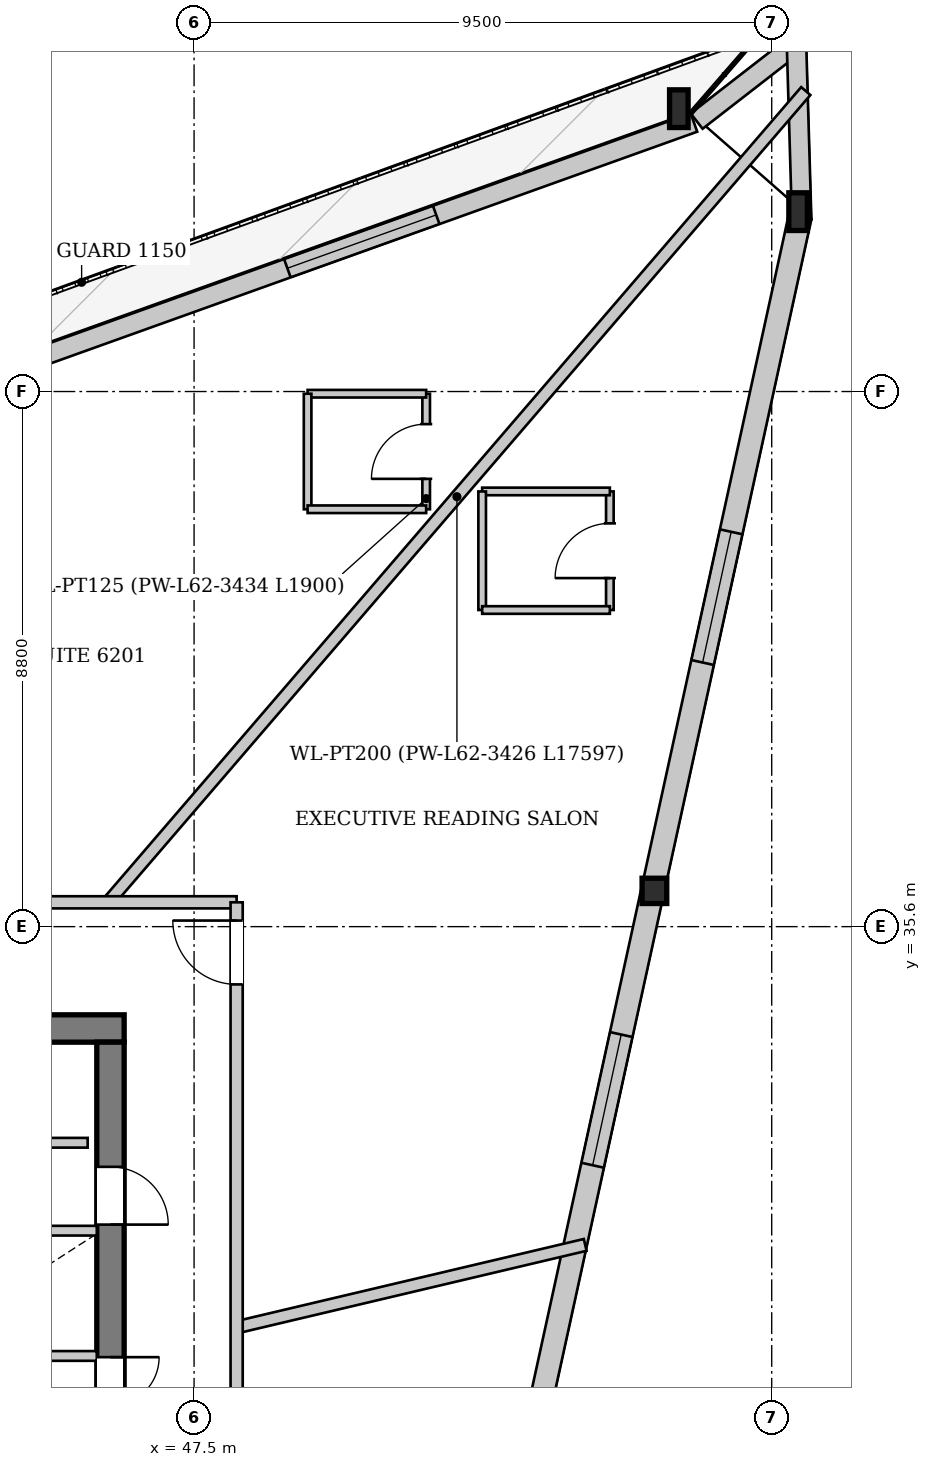
"""IFC4 building model, lengths in metres.
Left out: names, types, materials, properties, quantities, classifications, styles, units other than length and angle.
Written with IfcOpenShell. Run it as: python <this file> out.ifc"""

import sys

from ifc_helpers import new_model, si_unit, direction, frame, frame_2d, origin, origin_2d, place, context, subcontext, project, spatial, rectangle, i_section, extrude, source, transform, mapped, element, fill, save


model = new_model("IFC4")
c1 = context("Model", 3, precision=1e-05, world=origin(), true_north=direction((0.0, 1.0)))
c2 = subcontext(c1, "Body", "Model", "MODEL_VIEW")
j1 = project(units=[si_unit("LENGTHUNIT", "METRE"), si_unit("PLANEANGLEUNIT", "RADIAN")], contexts=[c1])
p1 = place(None, origin())
s1 = spatial("IfcSite", under=j1, at=p1, CompositionType="ELEMENT")
p2 = place(p1, origin())
s2 = spatial("IfcBuilding", under=s1, at=p2, CompositionType="ELEMENT")
p3 = place(p2, frame((0.0, 0.0, 234.5)))
s3 = spatial("IfcBuildingStorey", under=s2, at=p3, CompositionType="ELEMENT", Elevation=234.5)
m1 = source(origin(), c2, "Body", "SweptSolid", [
    extrude(i_section(OverallWidth=0.305, OverallDepth=0.62, WebThickness=0.021, FlangeThickness=0.04, at=origin_2d()), origin(), (0.0, 0.0, 1.0), 3.472),
])
p4 = place(p3, frame((57.653, 47.233, 0.0), z_axis=(-0.125805703613, 0.072150168757, 0.989427752838), x_axis=(-0.497496020718, -0.867466258347, 0.0)))
e1 = element("IfcColumn", 1, at=p4, inside=s3, PredefinedType="COLUMN", context=c2, shape_type="MappedRepresentation", body=[
    mapped(m1, transform((0.0, 0.0, 0.0), x_axis=(1.0, 0.0, 0.0), y_axis=(0.0, 1.0, 0.0), z_axis=(0.0, 0.0, 1.0), scale=1.0)),
])
m2 = source(origin(), c2, "Body", "SweptSolid", [
    extrude(i_section(OverallWidth=0.305, OverallDepth=0.62, WebThickness=0.021, FlangeThickness=0.04, at=origin_2d()), origin(), (0.0, 0.0, 1.0), 3.46),
])
p5 = place(p3, frame((55.667, 48.974, 0.0), z_axis=(-0.112317530713, 0.044941122528, 0.992655563527), x_axis=(-0.371491223958, -0.928436465528, 0.0)))
e2 = element("IfcColumn", 2, at=p5, inside=s3, PredefinedType="COLUMN", context=c2, shape_type="MappedRepresentation", body=[
    mapped(m2, transform((0.0, 0.0, 0.0), x_axis=(1.0, 0.0, 0.0), y_axis=(0.0, 1.0, 0.0), z_axis=(0.0, 0.0, 1.0), scale=1.0)),
])
m3 = source(origin(), c2, "Body", "SweptSolid", [
    extrude(i_section(OverallWidth=0.406, OverallDepth=0.416, WebThickness=0.027, FlangeThickness=0.042, at=origin_2d()), origin(), (0.0, 0.0, 1.0), 3.455),
])
p6 = place(p3, frame((55.209, 36.062, 0.0), z_axis=(-0.079842257415, 0.072847227783, 0.994142090113), x_axis=(-0.674005803271, -0.738726050141, 0.0)))
e3 = element("IfcColumn", 3, at=p6, inside=s3, PredefinedType="COLUMN", context=c2, shape_type="MappedRepresentation", body=[
    mapped(m3, transform((0.0, 0.0, 0.0), x_axis=(1.0, 0.0, 0.0), y_axis=(0.0, 1.0, 0.0), z_axis=(0.0, 0.0, 1.0), scale=1.0)),
])
p7 = place(p3, frame((34.711, 41.295, 0.0), z_axis=(0.0, 0.0, 1.0), x_axis=(0.941393680714, 0.337309854455, 0.0)))
e4 = element("IfcWall", 4, at=p7, inside=s3, PredefinedType="SOLIDWALL", context=c2, shape_type="SweptSolid", body=[
    extrude(rectangle(XDim=22.318, YDim=0.32, at=frame_2d((11.159, 0.0))), origin(), (0.0, 0.0, 1.0), 2.872),
])
p8 = place(p7, frame((6.392, 0.0, 0.0)))
e5 = element("IfcOpeningElement", 5, at=p8, cuts=e4, PredefinedType="OPENING", context=c2, shape_type="SweptSolid", body=[
    extrude(rectangle(XDim=1.5, YDim=2.3, at=frame_2d((0.75, 1.15))), frame((0.0, 0.17, 0.0), z_axis=(0.0, -1.0, 0.0), x_axis=(1.0, 0.0, 0.0)), (0.0, 0.0, 1.0), 0.34),
])
p9 = place(p7, frame((15.215, 0.0, 0.402)))
e6 = element("IfcOpeningElement", 6, at=p9, cuts=e4, PredefinedType="OPENING", context=c2, shape_type="SweptSolid", body=[
    extrude(rectangle(XDim=2.6, YDim=2.35, at=frame_2d((1.3, 1.175))), frame((0.0, 0.17, 0.0), z_axis=(0.0, -1.0, 0.0), x_axis=(1.0, 0.0, 0.0)), (0.0, 0.0, 1.0), 0.34),
])
p10 = place(p3, frame((55.765, 48.847, 0.0), z_axis=(0.0, 0.0, 1.0), x_axis=(0.790076637558, 0.613008080522, 0.0)))
e7 = element("IfcWall", 7, at=p10, inside=s3, PredefinedType="SOLIDWALL", context=c2, shape_type="SweptSolid", body=[
    extrude(rectangle(XDim=2.394, YDim=0.32, at=frame_2d((1.197, 0.0))), origin(), (0.0, 0.0, 1.0), 2.872),
])
p11 = place(p3, frame((57.398, 50.437, 0.0), z_axis=(0.0, 0.0, 1.0), x_axis=(0.029434813094, -0.999566702015, 0.0)))
e8 = element("IfcWall", 8, at=p11, inside=s3, PredefinedType="SOLIDWALL", context=c2, shape_type="SweptSolid", body=[
    extrude(rectangle(XDim=3.21, YDim=0.32, at=frame_2d((1.605, 0.0))), origin(), (0.0, 0.0, 1.0), 2.872),
])
p12 = place(p3, frame((57.467, 47.273, 0.0), z_axis=(0.0, 0.0, 1.0), x_axis=(-0.213695286904, -0.976900365623, 0.0)))
e9 = element("IfcWall", 9, at=p12, inside=s3, PredefinedType="SOLIDWALL", context=c2, shape_type="SweptSolid", body=[
    extrude(rectangle(XDim=22.869, YDim=0.38, at=frame_2d((11.435, 0.0))), origin(), (0.0, 0.0, 1.0), 2.872),
])
p13 = place(p12, frame((5.303, 0.0, 0.502)))
e10 = element("IfcOpeningElement", 10, at=p13, cuts=e9, PredefinedType="OPENING", context=c2, shape_type="SweptSolid", body=[
    extrude(rectangle(XDim=2.2, YDim=2.25, at=frame_2d((1.1, 1.125))), frame((0.0, 0.2, 0.0), z_axis=(0.0, -1.0, 0.0), x_axis=(1.0, 0.0, 0.0)), (0.0, 0.0, 1.0), 0.4),
])
p14 = place(p12, frame((13.766, 0.0, 0.502)))
e11 = element("IfcOpeningElement", 11, at=p14, cuts=e9, PredefinedType="OPENING", context=c2, shape_type="SweptSolid", body=[
    extrude(rectangle(XDim=2.2, YDim=2.25, at=frame_2d((1.1, 1.125))), frame((0.0, 0.2, 0.0), z_axis=(0.0, -1.0, 0.0), x_axis=(1.0, 0.0, 0.0)), (0.0, 0.0, 1.0), 0.4),
])
p15 = place(p3, frame((29.65, 33.925, 0.0), z_axis=(0.0, 0.0, 1.0), x_axis=(1.0, 0.0, 0.0)))
e12 = element("IfcWall", 12, at=p15, inside=s3, PredefinedType="SHEAR", context=c2, shape_type="SweptSolid", body=[
    extrude(rectangle(XDim=16.7, YDim=0.45, at=frame_2d((8.35, 0.0))), origin(), (0.0, 0.0, 1.0), 3.38),
])
p16 = place(p15, frame((1.45, 0.0, 0.0)))
e13 = element("IfcOpeningElement", 13, at=p16, cuts=e12, PredefinedType="OPENING", context=c2, shape_type="SweptSolid", body=[
    extrude(rectangle(XDim=0.95, YDim=2.1, at=frame_2d((0.475, 1.05))), frame((0.0, 0.235, 0.0), z_axis=(0.0, -1.0, 0.0), x_axis=(1.0, 0.0, 0.0)), (0.0, 0.0, 1.0), 0.47),
])
p17 = place(p15, frame((3.83, 0.0, 0.0)))
e14 = element("IfcOpeningElement", 14, at=p17, cuts=e12, PredefinedType="OPENING", context=c2, shape_type="SweptSolid", body=[
    extrude(rectangle(XDim=1.32, YDim=2.2, at=frame_2d((0.66, 1.1))), frame((0.0, 0.235, 0.0), z_axis=(0.0, -1.0, 0.0), x_axis=(1.0, 0.0, 0.0)), (0.0, 0.0, 1.0), 0.47),
])
p18 = place(p3, frame((46.125, 33.7, 0.0), z_axis=(0.0, 0.0, 1.0), x_axis=(0.0, -1.0, 0.0)))
e15 = element("IfcWall", 15, at=p18, inside=s3, PredefinedType="SHEAR", context=c2, shape_type="SweptSolid", body=[
    extrude(rectangle(XDim=14.2, YDim=0.45, at=frame_2d((7.1, 0.0))), origin(), (0.0, 0.0, 1.0), 3.38),
])
p19 = place(p18, frame((5.18, 0.0, 0.0)))
e16 = element("IfcOpeningElement", 16, at=p19, cuts=e15, PredefinedType="OPENING", context=c2, shape_type="SweptSolid", body=[
    extrude(rectangle(XDim=1.6, YDim=2.2, at=frame_2d((0.8, 1.1))), frame((0.0, 0.235, 0.0), z_axis=(0.0, -1.0, 0.0), x_axis=(1.0, 0.0, 0.0)), (0.0, 0.0, 1.0), 0.47),
])
p20 = place(p18, frame((2.05, 0.0, 0.0)))
e17 = element("IfcOpeningElement", 17, at=p20, cuts=e15, PredefinedType="OPENING", context=c2, shape_type="SweptSolid", body=[
    extrude(rectangle(XDim=0.95, YDim=2.1, at=frame_2d((0.475, 1.05))), frame((0.0, 0.235, 0.0), z_axis=(0.0, -1.0, 0.0), x_axis=(1.0, 0.0, 0.0)), (0.0, 0.0, 1.0), 0.47),
])
p21 = place(p3, frame((33.28, 28.54, 0.0), z_axis=(0.0, 0.0, 1.0), x_axis=(1.0, 0.0, 0.0)))
e18 = element("IfcWall", 18, at=p21, inside=s3, PredefinedType="PARTITIONING", context=c2, shape_type="SweptSolid", body=[
    extrude(rectangle(XDim=12.62, YDim=0.16, at=frame_2d((6.31, 0.0))), origin(), (0.0, 0.0, 1.0), 3.38),
])
p22 = place(p21, frame((0.26, 0.0, 0.0)))
e19 = element("IfcOpeningElement", 19, at=p22, cuts=e18, PredefinedType="OPENING", context=c2, shape_type="SweptSolid", body=[
    extrude(rectangle(XDim=1.1, YDim=2.2, at=frame_2d((0.55, 1.1))), frame((0.0, 0.09, 0.0), z_axis=(0.0, -1.0, 0.0), x_axis=(1.0, 0.0, 0.0)), (0.0, 0.0, 1.0), 0.18),
])
p23 = place(p21, frame((2.01, 0.0, 0.0)))
e20 = element("IfcOpeningElement", 20, at=p23, cuts=e18, PredefinedType="OPENING", context=c2, shape_type="SweptSolid", body=[
    extrude(rectangle(XDim=1.1, YDim=2.2, at=frame_2d((0.55, 1.1))), frame((0.0, 0.09, 0.0), z_axis=(0.0, -1.0, 0.0), x_axis=(1.0, 0.0, 0.0)), (0.0, 0.0, 1.0), 0.18),
])
p24 = place(p21, frame((3.76, 0.0, 0.0)))
e21 = element("IfcOpeningElement", 21, at=p24, cuts=e18, PredefinedType="OPENING", context=c2, shape_type="SweptSolid", body=[
    extrude(rectangle(XDim=1.1, YDim=2.2, at=frame_2d((0.55, 1.1))), frame((0.0, 0.09, 0.0), z_axis=(0.0, -1.0, 0.0), x_axis=(1.0, 0.0, 0.0)), (0.0, 0.0, 1.0), 0.18),
])
p25 = place(p3, frame((40.72, 30.6, 0.0), z_axis=(0.0, 0.0, 1.0), x_axis=(1.0, 0.0, 0.0)))
e22 = element("IfcWall", 22, at=p25, inside=s3, PredefinedType="PARTITIONING", context=c2, shape_type="SweptSolid", body=[
    extrude(rectangle(XDim=5.18, YDim=0.16, at=frame_2d((2.59, 0.0))), origin(), (0.0, 0.0, 1.0), 3.38),
])
p26 = place(p3, frame((40.72, 32.046, 0.0), z_axis=(0.0, 0.0, 1.0), x_axis=(1.0, 0.0, 0.0)))
e23 = element("IfcWall", 23, at=p26, inside=s3, PredefinedType="PARTITIONING", context=c2, shape_type="SweptSolid", body=[
    extrude(rectangle(XDim=5.03, YDim=0.16, at=frame_2d((2.515, 0.0))), origin(), (0.0, 0.0, 1.0), 3.38),
])
p27 = place(p26, frame((2.1, 0.0, 0.0)))
e24 = element("IfcOpeningElement", 24, at=p27, cuts=e23, PredefinedType="OPENING", context=c2, shape_type="SweptSolid", body=[
    extrude(rectangle(XDim=0.95, YDim=2.1, at=frame_2d((0.475, 1.05))), frame((0.0, 0.09, 0.0), z_axis=(0.0, -1.0, 0.0), x_axis=(1.0, 0.0, 0.0)), (0.0, 0.0, 1.0), 0.18),
])
p28 = place(p3, frame((46.085, 36.0, 0.0), z_axis=(0.0, 0.0, 1.0), x_axis=(0.652105460698, 0.758128266277, 0.0)))
e25 = element("IfcWall", 25, at=p28, inside=s3, PredefinedType="PARTITIONING", context=c2, shape_type="SweptSolid", body=[
    extrude(rectangle(XDim=17.597, YDim=0.2, at=frame_2d((8.799, 0.0))), origin(), (0.0, 0.0, 1.0), 2.975),
])
p29 = place(p3, frame((48.2, 29.011, 0.0), z_axis=(0.0, 0.0, 1.0), x_axis=(0.973180732473, 0.230041869979, 0.0)))
e26 = element("IfcWall", 26, at=p29, inside=s3, PredefinedType="PARTITIONING", context=c2, shape_type="SweptSolid", body=[
    extrude(rectangle(XDim=5.89, YDim=0.2, at=frame_2d((2.945, 0.0))), origin(), (0.0, 0.0, 1.0), 3.38),
])
p30 = place(p3, frame((51.317, 42.464, 0.0), z_axis=(0.0, 0.0, 1.0), x_axis=(0.0, 1.0, 0.0)))
e27 = element("IfcWall", 27, at=p30, inside=s3, PredefinedType="PARTITIONING", context=c2, shape_type="SweptSolid", body=[
    extrude(rectangle(XDim=1.9, YDim=0.125, at=frame_2d((0.95, 0.0))), origin(), (0.0, 0.0, 1.0), 3.38),
])
p31 = place(p30, frame((0.5, 0.0, 0.0)))
e28 = element("IfcOpeningElement", 28, at=p31, cuts=e27, PredefinedType="OPENING", context=c2, shape_type="SweptSolid", body=[
    extrude(rectangle(XDim=0.9, YDim=2.1, at=frame_2d((0.45, 1.05))), frame((0.0, 0.073, 0.0), z_axis=(0.0, -1.0, 0.0), x_axis=(1.0, 0.0, 0.0)), (0.0, 0.0, 1.0), 0.145),
])
p32 = place(p3, frame((51.317, 44.364, 0.0), z_axis=(0.0, 0.0, 1.0), x_axis=(-1.0, 0.0, 0.0)))
e29 = element("IfcWall", 29, at=p32, inside=s3, PredefinedType="PARTITIONING", context=c2, shape_type="SweptSolid", body=[
    extrude(rectangle(XDim=1.95, YDim=0.125, at=frame_2d((0.975, 0.0))), origin(), (0.0, 0.0, 1.0), 3.38),
])
p33 = place(p3, frame((49.367, 44.364, 0.0), z_axis=(0.0, 0.0, 1.0), x_axis=(0.0, -1.0, 0.0)))
e30 = element("IfcWall", 30, at=p33, inside=s3, PredefinedType="PARTITIONING", context=c2, shape_type="SweptSolid", body=[
    extrude(rectangle(XDim=1.9, YDim=0.125, at=frame_2d((0.95, 0.0))), origin(), (0.0, 0.0, 1.0), 3.38),
])
p34 = place(p3, frame((49.367, 42.464, 0.0), z_axis=(0.0, 0.0, 1.0), x_axis=(1.0, 0.0, 0.0)))
e31 = element("IfcWall", 31, at=p34, inside=s3, PredefinedType="PARTITIONING", context=c2, shape_type="SweptSolid", body=[
    extrude(rectangle(XDim=1.95, YDim=0.125, at=frame_2d((0.975, 0.0))), origin(), (0.0, 0.0, 1.0), 3.125),
])
p35 = place(p3, frame((54.338, 40.807, 0.0), z_axis=(0.0, 0.0, 1.0), x_axis=(0.0, 1.0, 0.0)))
e32 = element("IfcWall", 32, at=p35, inside=s3, PredefinedType="PARTITIONING", context=c2, shape_type="SweptSolid", body=[
    extrude(rectangle(XDim=1.95, YDim=0.125, at=frame_2d((0.975, 0.0))), origin(), (0.0, 0.0, 1.0), 3.38),
])
p36 = place(p35, frame((0.525, 0.0, 0.0)))
e33 = element("IfcOpeningElement", 33, at=p36, cuts=e32, PredefinedType="OPENING", context=c2, shape_type="SweptSolid", body=[
    extrude(rectangle(XDim=0.9, YDim=2.1, at=frame_2d((0.45, 1.05))), frame((0.0, 0.073, 0.0), z_axis=(0.0, -1.0, 0.0), x_axis=(1.0, 0.0, 0.0)), (0.0, 0.0, 1.0), 0.145),
])
p37 = place(p3, frame((54.338, 42.757, 0.0), z_axis=(0.0, 0.0, 1.0), x_axis=(-1.0, 0.0, 0.0)))
e34 = element("IfcWall", 34, at=p37, inside=s3, PredefinedType="PARTITIONING", context=c2, shape_type="SweptSolid", body=[
    extrude(rectangle(XDim=2.1, YDim=0.125, at=frame_2d((1.05, 0.0))), origin(), (0.0, 0.0, 1.0), 3.38),
])
p38 = place(p3, frame((52.238, 42.757, 0.0), z_axis=(0.0, 0.0, 1.0), x_axis=(0.0, -1.0, 0.0)))
e35 = element("IfcWall", 35, at=p38, inside=s3, PredefinedType="PARTITIONING", context=c2, shape_type="SweptSolid", body=[
    extrude(rectangle(XDim=1.95, YDim=0.125, at=frame_2d((0.975, 0.0))), origin(), (0.0, 0.0, 1.0), 3.38),
])
p39 = place(p3, frame((52.238, 40.807, 0.0), z_axis=(0.0, 0.0, 1.0), x_axis=(1.0, 0.0, 0.0)))
e36 = element("IfcWall", 36, at=p39, inside=s3, PredefinedType="PARTITIONING", context=c2, shape_type="SweptSolid", body=[
    extrude(rectangle(XDim=2.1, YDim=0.125, at=frame_2d((1.05, 0.0))), origin(), (0.0, 0.0, 1.0), 3.38),
])
p40 = place(p3, frame((43.4, 36.0, 0.0), z_axis=(0.0, 0.0, 1.0), x_axis=(1.0, 0.0, 0.0)))
e37 = element("IfcWall", 37, at=p40, inside=s3, PredefinedType="PARTITIONING", context=c2, shape_type="SweptSolid", body=[
    extrude(rectangle(XDim=4.8, YDim=0.2, at=frame_2d((2.4, 0.0))), origin(), (0.0, 0.0, 1.0), 3.38),
])
p41 = place(p3, frame((48.2, 17.2, 0.0), z_axis=(0.0, 0.0, 1.0), x_axis=(0.0, 1.0, 0.0)))
e38 = element("IfcWall", 38, at=p41, inside=s3, PredefinedType="PARTITIONING", context=c2, shape_type="SweptSolid", body=[
    extrude(rectangle(XDim=18.8, YDim=0.2, at=frame_2d((9.4, 0.0))), origin(), (0.0, 0.0, 1.0), 3.065),
])
p42 = place(p41, frame((4.507, 0.0, 0.0)))
e39 = element("IfcOpeningElement", 39, at=p42, cuts=e38, PredefinedType="OPENING", context=c2, shape_type="SweptSolid", body=[
    extrude(rectangle(XDim=1.05, YDim=2.2, at=frame_2d((0.525, 1.1))), frame((0.0, 0.11, 0.0), z_axis=(0.0, -1.0, 0.0), x_axis=(1.0, 0.0, 0.0)), (0.0, 0.0, 1.0), 0.22),
])
p43 = place(p41, frame((17.45, 0.0, 0.0)))
e40 = element("IfcOpeningElement", 40, at=p43, cuts=e38, PredefinedType="OPENING", context=c2, shape_type="SweptSolid", body=[
    extrude(rectangle(XDim=1.05, YDim=2.2, at=frame_2d((0.525, 1.1))), frame((0.0, 0.11, 0.0), z_axis=(0.0, -1.0, 0.0), x_axis=(1.0, 0.0, 0.0)), (0.0, 0.0, 1.0), 0.22),
])
m4 = source(origin(), c2, "Body", "SweptSolid", [
    extrude(rectangle(XDim=2.6, YDim=2.35, at=frame_2d((1.3, 1.175))), frame((0.0, 0.03, 0.0), z_axis=(0.0, -1.0, 0.0), x_axis=(1.0, 0.0, 0.0)), (0.0, 0.0, 1.0), 0.06),
])
p44 = place(p9, origin())
e41 = element("IfcWindow", 41, at=p44, inside=s3, PartitioningType="SINGLE_PANEL", PredefinedType="WINDOW", context=c2, shape_type="MappedRepresentation", body=[
    mapped(m4, transform((0.0, 0.0, 0.0), x_axis=(1.0, 0.0, 0.0), y_axis=(0.0, 1.0, 0.0), z_axis=(0.0, 0.0, 1.0), scale=1.0)),
])
fill(e6, e41)
m5 = source(origin(), c2, "Body", "SweptSolid", [
    extrude(rectangle(XDim=2.2, YDim=2.25, at=frame_2d((1.1, 1.125))), frame((0.0, 0.03, 0.0), z_axis=(0.0, -1.0, 0.0), x_axis=(1.0, 0.0, 0.0)), (0.0, 0.0, 1.0), 0.06),
])
p45 = place(p13, origin())
e42 = element("IfcWindow", 42, at=p45, inside=s3, PartitioningType="SINGLE_PANEL", PredefinedType="WINDOW", context=c2, shape_type="MappedRepresentation", body=[
    mapped(m5, transform((0.0, 0.0, 0.0), x_axis=(1.0, 0.0, 0.0), y_axis=(0.0, 1.0, 0.0), z_axis=(0.0, 0.0, 1.0), scale=1.0)),
])
fill(e10, e42)
p46 = place(p14, origin())
e43 = element("IfcWindow", 43, at=p46, inside=s3, PartitioningType="SINGLE_PANEL", PredefinedType="WINDOW", context=c2, shape_type="MappedRepresentation", body=[
    mapped(m5, transform((0.0, 0.0, 0.0), x_axis=(1.0, 0.0, 0.0), y_axis=(0.0, 1.0, 0.0), z_axis=(0.0, 0.0, 1.0), scale=1.0)),
])
fill(e11, e43)
m6 = source(origin(), c2, "Body", "SweptSolid", [
    extrude(rectangle(XDim=1.6, YDim=2.2, at=frame_2d((0.8, 1.1))), frame((0.0, 0.025, 0.0), z_axis=(0.0, -1.0, 0.0), x_axis=(1.0, 0.0, 0.0)), (0.0, 0.0, 1.0), 0.05),
])
p47 = place(p19, origin())
e44 = element("IfcDoor", 44, at=p47, inside=s3, OperationType="DOUBLE_DOOR_SINGLE_SWING", PredefinedType="DOOR", context=c2, shape_type="MappedRepresentation", body=[
    mapped(m6, transform((0.0, 0.0, 0.0), x_axis=(1.0, 0.0, 0.0), y_axis=(0.0, 1.0, 0.0), z_axis=(0.0, 0.0, 1.0), scale=1.0)),
])
fill(e16, e44)
m7 = source(origin(), c2, "Body", "SweptSolid", [
    extrude(rectangle(XDim=0.95, YDim=2.1, at=frame_2d((0.475, 1.05))), frame((0.0, 0.025, 0.0), z_axis=(0.0, -1.0, 0.0), x_axis=(1.0, 0.0, 0.0)), (0.0, 0.0, 1.0), 0.05),
])
p48 = place(p20, origin())
e45 = element("IfcDoor", 45, at=p48, inside=s3, OperationType="SINGLE_SWING_RIGHT", PredefinedType="DOOR", context=c2, shape_type="MappedRepresentation", body=[
    mapped(m7, transform((0.0, 0.0, 0.0), x_axis=(1.0, 0.0, 0.0), y_axis=(0.0, 1.0, 0.0), z_axis=(0.0, 0.0, 1.0), scale=1.0)),
])
fill(e17, e45)
m8 = source(origin(), c2, "Body", "SweptSolid", [
    extrude(rectangle(XDim=0.9, YDim=2.1, at=frame_2d((0.45, 1.05))), frame((0.0, 0.025, 0.0), z_axis=(0.0, -1.0, 0.0), x_axis=(1.0, 0.0, 0.0)), (0.0, 0.0, 1.0), 0.05),
])
p49 = place(p31, origin())
e46 = element("IfcDoor", 46, at=p49, inside=s3, OperationType="SINGLE_SWING_LEFT", PredefinedType="DOOR", context=c2, shape_type="MappedRepresentation", body=[
    mapped(m8, transform((0.0, 0.0, 0.0), x_axis=(1.0, 0.0, 0.0), y_axis=(0.0, 1.0, 0.0), z_axis=(0.0, 0.0, 1.0), scale=1.0)),
])
fill(e28, e46)
p50 = place(p36, origin())
e47 = element("IfcDoor", 47, at=p50, inside=s3, OperationType="SINGLE_SWING_LEFT", PredefinedType="DOOR", context=c2, shape_type="MappedRepresentation", body=[
    mapped(m8, transform((0.0, 0.0, 0.0), x_axis=(1.0, 0.0, 0.0), y_axis=(0.0, 1.0, 0.0), z_axis=(0.0, 0.0, 1.0), scale=1.0)),
])
fill(e33, e47)
m9 = source(origin(), c2, "Body", "SweptSolid", [
    extrude(rectangle(XDim=1.05, YDim=2.2, at=frame_2d((0.525, 1.1))), frame((0.0, 0.025, 0.0), z_axis=(0.0, -1.0, 0.0), x_axis=(1.0, 0.0, 0.0)), (0.0, 0.0, 1.0), 0.05),
])
p51 = place(p43, origin())
e48 = element("IfcDoor", 48, at=p51, inside=s3, OperationType="SINGLE_SWING_RIGHT", PredefinedType="DOOR", context=c2, shape_type="MappedRepresentation", body=[
    mapped(m9, transform((0.0, 0.0, 0.0), x_axis=(1.0, 0.0, 0.0), y_axis=(0.0, 1.0, 0.0), z_axis=(0.0, 0.0, 1.0), scale=1.0)),
])
fill(e40, e48)
save(model, sys.argv[1])
